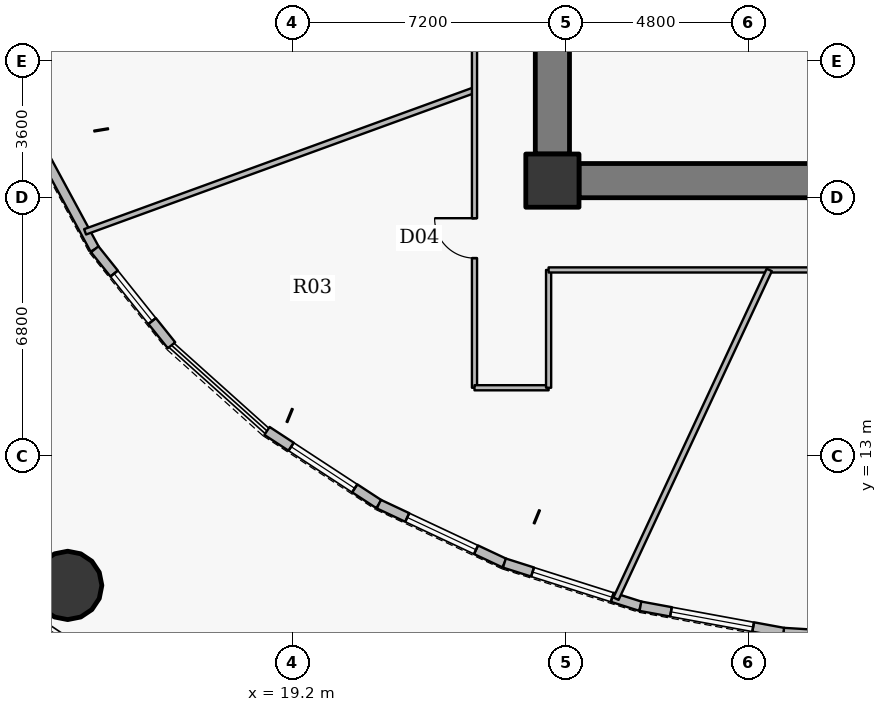
"""IFC4 building model, lengths in metres.
Left out: names, types, materials, properties, quantities, classifications, styles, units other than length and angle.
Written with IfcOpenShell. Run it as: python <this file> out.ifc"""

import sys

from ifc_helpers import new_model, si_unit, direction, frame, frame_2d, origin, origin_2d, place, context, subcontext, project, spatial, rectangle, hollow_circle, extrude, source, transform, mapped, element, fill, save


model = new_model("IFC4")
c1 = context("Model", 3, precision=1e-05, world=origin(), true_north=direction((0.0, 1.0)))
c2 = subcontext(c1, "Body", "Model", "MODEL_VIEW")
j1 = project(units=[si_unit("LENGTHUNIT", "METRE"), si_unit("PLANEANGLEUNIT", "RADIAN")], contexts=[c1])
p1 = place(None, origin())
s1 = spatial("IfcSite", under=j1, at=p1, CompositionType="ELEMENT")
p2 = place(p1, origin())
s2 = spatial("IfcBuilding", under=s1, at=p2, CompositionType="ELEMENT")
p3 = place(p2, frame((0.0, 0.0, 27.0)))
s3 = spatial("IfcBuildingStorey", under=s2, at=p3, CompositionType="ELEMENT", Elevation=27.0)
p4 = place(p3, frame((26.05, 20.25, 0.0), z_axis=(0.0, 0.0, 1.0), x_axis=(1.0, 0.0, 0.0)))
e1 = element("IfcColumn", 1, at=p4, inside=s3, PredefinedType="COLUMN", context=c2, shape_type="SweptSolid", body=[
    extrude(rectangle(XDim=1.4, YDim=1.4, at=origin_2d()), origin(), (0.0, 0.0, 1.0), 5.4),
])
p5 = place(p3, frame((45.25, 20.25, 0.0), z_axis=(0.0, 0.0, 1.0), x_axis=(-1.0, 0.0, 0.0)))
e2 = element("IfcWall", 2, at=p5, inside=s3, PredefinedType="SHEAR", context=c2, shape_type="SweptSolid", body=[
    extrude(rectangle(XDim=18.5, YDim=0.9, at=frame_2d((9.25, 0.0))), origin(), (0.0, 0.0, 1.0), 4.6),
])
p6 = place(p5, frame((10.0, 0.0, 0.0)))
e3 = element("IfcOpeningElement", 3, at=p6, cuts=e2, PredefinedType="OPENING", context=c2, shape_type="SweptSolid", body=[
    extrude(rectangle(XDim=1.15, YDim=2.15, at=origin_2d()), frame((0.575, 0.46, 1.075), z_axis=(0.0, -1.0, 0.0), x_axis=(1.0, 0.0, 0.0)), (0.0, 0.0, 1.0), 0.92),
])
p7 = place(p3, frame((26.05, 20.95, 0.0), z_axis=(0.0, 0.0, 1.0), x_axis=(0.0, 1.0, 0.0)))
e4 = element("IfcWall", 4, at=p7, inside=s3, PredefinedType="SHEAR", context=c2, shape_type="SweptSolid", body=[
    extrude(rectangle(XDim=12.1, YDim=0.9, at=frame_2d((6.05, 0.0))), origin(), (0.0, 0.0, 1.0), 4.6),
])
p8 = place(p7, frame((5.64, 0.0, 0.0)))
e5 = element("IfcOpeningElement", 5, at=p8, cuts=e4, PredefinedType="OPENING", context=c2, shape_type="SweptSolid", body=[
    extrude(rectangle(XDim=0.82, YDim=2.1, at=origin_2d()), frame((0.41, 0.46, 1.05), z_axis=(0.0, -1.0, 0.0), x_axis=(1.0, 0.0, 0.0)), (0.0, 0.0, 1.0), 0.92),
])
p9 = place(p3, frame((13.295, 9.599, 0.0), z_axis=(0.0, 0.0, 1.0), x_axis=(1.0, 0.0, 0.0)))
e6 = element("IfcColumn", 6, at=p9, inside=s3, PredefinedType="COLUMN", context=c2, shape_type="SweptSolid", body=[
    extrude(hollow_circle(Radius=0.9, WallThickness=0.05, at=origin_2d()), origin(), (0.0, 0.0, 1.0), 5.15),
])
p10 = place(p3, frame((14.007, 18.443, 0.0), z_axis=(0.0, 0.0, 1.0), x_axis=(-0.475607390776, 0.879657666276, 0.0)))
e7 = element("IfcWall", 7, at=p10, inside=s3, PredefinedType="SOLIDWALL", context=c2, shape_type="SweptSolid", body=[
    extrude(rectangle(XDim=3.108, YDim=0.25, at=frame_2d((1.554, 0.0))), origin(), (0.0, 0.0, 1.0), 3.185),
])
p11 = place(p3, frame((16.027, 15.918, 0.0), z_axis=(0.0, 0.0, 1.0), x_axis=(-0.624639806262, 0.780912999272, 0.0)))
e8 = element("IfcWall", 8, at=p11, inside=s3, PredefinedType="SOLIDWALL", context=c2, shape_type="SweptSolid", body=[
    extrude(rectangle(XDim=3.234, YDim=0.25, at=frame_2d((1.617, 0.0))), origin(), (0.0, 0.0, 1.0), 5.15),
])
p12 = place(p11, frame((0.817, 0.0, 0.9)))
e9 = element("IfcOpeningElement", 9, at=p12, cuts=e8, PredefinedType="OPENING", context=c2, shape_type="SweptSolid", body=[
    extrude(rectangle(XDim=1.6, YDim=1.75, at=origin_2d()), frame((0.8, 0.135, 0.875), z_axis=(0.0, -1.0, 0.0), x_axis=(1.0, 0.0, 0.0)), (0.0, 0.0, 1.0), 0.27),
])
p13 = place(p3, frame((21.484, 11.738, 0.0), z_axis=(0.0, 0.0, 1.0), x_axis=(-0.836749499899, 0.547585860317, 0.0)))
e10 = element("IfcWall", 10, at=p13, inside=s3, PredefinedType="SOLIDWALL", context=c2, shape_type="SweptSolid", body=[
    extrude(rectangle(XDim=3.518, YDim=0.25, at=frame_2d((1.759, 0.0))), origin(), (0.0, 0.0, 1.0), 3.185),
])
p14 = place(p13, frame((0.759, 0.0, 0.9)))
e11 = element("IfcOpeningElement", 11, at=p14, cuts=e10, PredefinedType="OPENING", context=c2, shape_type="SweptSolid", body=[
    extrude(rectangle(XDim=2.0, YDim=1.75, at=origin_2d()), frame((1.0, 0.135, 0.875), z_axis=(0.0, -1.0, 0.0), x_axis=(1.0, 0.0, 0.0)), (0.0, 0.0, 1.0), 0.27),
])
p15 = place(p3, frame((24.786, 10.187, 0.0), z_axis=(0.0, 0.0, 1.0), x_axis=(-0.905208052634, 0.424968682901, 0.0)))
e12 = element("IfcWall", 12, at=p15, inside=s3, PredefinedType="SOLIDWALL", context=c2, shape_type="SweptSolid", body=[
    extrude(rectangle(XDim=3.649, YDim=0.25, at=frame_2d((1.824, 0.0))), origin(), (0.0, 0.0, 1.0), 3.185),
])
p16 = place(p15, frame((0.824, 0.0, 0.9)))
e13 = element("IfcOpeningElement", 13, at=p16, cuts=e12, PredefinedType="OPENING", context=c2, shape_type="SweptSolid", body=[
    extrude(rectangle(XDim=2.0, YDim=1.75, at=origin_2d()), frame((1.0, 0.135, 0.875), z_axis=(0.0, -1.0, 0.0), x_axis=(1.0, 0.0, 0.0)), (0.0, 0.0, 1.0), 0.27),
])
p17 = place(p3, frame((28.366, 9.051, 0.0), z_axis=(0.0, 0.0, 1.0), x_axis=(-0.953166212936, 0.302446971412, 0.0)))
e14 = element("IfcWall", 14, at=p17, inside=s3, PredefinedType="SOLIDWALL", context=c2, shape_type="SweptSolid", body=[
    extrude(rectangle(XDim=3.756, YDim=0.25, at=frame_2d((1.878, 0.0))), origin(), (0.0, 0.0, 1.0), 3.185),
])
p18 = place(p17, frame((0.778, 0.0, 0.9)))
e15 = element("IfcOpeningElement", 15, at=p18, cuts=e14, PredefinedType="OPENING", context=c2, shape_type="SweptSolid", body=[
    extrude(rectangle(XDim=2.2, YDim=2.0, at=origin_2d()), frame((1.1, 0.135, 1.0), z_axis=(0.0, -1.0, 0.0), x_axis=(1.0, 0.0, 0.0)), (0.0, 0.0, 1.0), 0.27),
])
p19 = place(p3, frame((32.135, 8.358, 0.0), z_axis=(0.0, 0.0, 1.0), x_axis=(-0.983496768781, 0.180925691368, 0.0)))
e16 = element("IfcWall", 16, at=p19, inside=s3, PredefinedType="SOLIDWALL", context=c2, shape_type="SweptSolid", body=[
    extrude(rectangle(XDim=3.832, YDim=0.25, at=frame_2d((1.916, 0.0))), origin(), (0.0, 0.0, 1.0), 5.15),
])
p20 = place(p19, frame((0.816, 0.0, 0.9)))
e17 = element("IfcOpeningElement", 17, at=p20, cuts=e16, PredefinedType="OPENING", context=c2, shape_type="SweptSolid", body=[
    extrude(rectangle(XDim=2.2, YDim=2.0, at=origin_2d()), frame((1.1, 0.135, 1.0), z_axis=(0.0, -1.0, 0.0), x_axis=(1.0, 0.0, 0.0)), (0.0, 0.0, 1.0), 0.27),
])
p21 = place(p3, frame((36.0, 8.125, 0.0), z_axis=(0.0, 0.0, 1.0), x_axis=(-0.998188749064, 0.060159963776, 0.0)))
e18 = element("IfcWall", 18, at=p21, inside=s3, PredefinedType="SOLIDWALL", context=c2, shape_type="SweptSolid", body=[
    extrude(rectangle(XDim=3.872, YDim=0.25, at=frame_2d((1.936, 0.0))), origin(), (0.0, 0.0, 1.0), 3.185),
])
p22 = place(p21, frame((0.836, 0.0, 0.9)))
e19 = element("IfcOpeningElement", 19, at=p22, cuts=e18, PredefinedType="OPENING", context=c2, shape_type="SweptSolid", body=[
    extrude(rectangle(XDim=2.2, YDim=2.0, at=origin_2d()), frame((1.1, 0.135, 1.0), z_axis=(0.0, -1.0, 0.0), x_axis=(1.0, 0.0, 0.0)), (0.0, 0.0, 1.0), 0.27),
])
p23 = place(p3, frame((13.753, 18.903, 0.0), z_axis=(0.0, 0.0, 1.0), x_axis=(0.939694021803, 0.342016294038, 0.0)))
e20 = element("IfcWall", 20, at=p23, inside=s3, PredefinedType="PARTITIONING", context=c2, shape_type="SweptSolid", body=[
    extrude(rectangle(XDim=10.905, YDim=0.15, at=frame_2d((5.452, 0.0))), origin(), (0.0, 0.0, 1.0), 5.15),
])
p24 = place(p3, frame((24.0, 14.8, 0.0), z_axis=(0.0, 0.0, 1.0), x_axis=(0.0, 1.0, 0.0)))
e21 = element("IfcWall", 21, at=p24, inside=s3, PredefinedType="PARTITIONING", context=c2, shape_type="SweptSolid", body=[
    extrude(rectangle(XDim=12.78, YDim=0.135, at=frame_2d((6.39, 0.0))), origin(), (0.0, 0.0, 1.0), 3.185),
])
p25 = place(p24, frame((3.411, 0.0, 0.0)))
e22 = element("IfcOpeningElement", 22, at=p25, cuts=e21, PredefinedType="OPENING", context=c2, shape_type="SweptSolid", body=[
    extrude(rectangle(XDim=1.05, YDim=2.15, at=origin_2d()), frame((0.525, 0.078, 1.075), z_axis=(0.0, -1.0, 0.0), x_axis=(1.0, 0.0, 0.0)), (0.0, 0.0, 1.0), 0.155),
])
p26 = place(p3, frame((24.0, 14.8, 0.0), z_axis=(0.0, 0.0, 1.0), x_axis=(1.0, 0.0, 0.0)))
e23 = element("IfcWall", 23, at=p26, inside=s3, PredefinedType="PARTITIONING", context=c2, shape_type="SweptSolid", body=[
    extrude(rectangle(XDim=1.95, YDim=0.135, at=frame_2d((0.975, 0.0))), origin(), (0.0, 0.0, 1.0), 5.15),
])
p27 = place(p3, frame((25.95, 14.8, 0.0), z_axis=(0.0, 0.0, 1.0), x_axis=(0.0, 1.0, 0.0)))
e24 = element("IfcWall", 24, at=p27, inside=s3, PredefinedType="PARTITIONING", context=c2, shape_type="SweptSolid", body=[
    extrude(rectangle(XDim=3.1, YDim=0.135, at=frame_2d((1.55, 0.0))), origin(), (0.0, 0.0, 1.0), 5.15),
])
p28 = place(p3, frame((25.95, 17.9, 0.0), z_axis=(0.0, 0.0, 1.0), x_axis=(1.0, 0.0, 0.0)))
e25 = element("IfcWall", 25, at=p28, inside=s3, PredefinedType="PARTITIONING", context=c2, shape_type="SweptSolid", body=[
    extrude(rectangle(XDim=10.25, YDim=0.135, at=frame_2d((5.125, 0.0))), origin(), (0.0, 0.0, 1.0), 3.185),
])
p29 = place(p28, frame((7.483, 0.0, 0.0)))
e26 = element("IfcOpeningElement", 26, at=p29, cuts=e25, PredefinedType="OPENING", context=c2, shape_type="SweptSolid", body=[
    extrude(rectangle(XDim=1.05, YDim=2.15, at=origin_2d()), frame((0.525, 0.078, 1.075), z_axis=(0.0, -1.0, 0.0), x_axis=(1.0, 0.0, 0.0)), (0.0, 0.0, 1.0), 0.155),
])
p30 = place(p3, frame((27.723, 9.25, 0.0), z_axis=(0.0, 0.0, 1.0), x_axis=(0.422622169532, 0.906305964793, 0.0)))
e27 = element("IfcWall", 27, at=p30, inside=s3, PredefinedType="PARTITIONING", context=c2, shape_type="SweptSolid", body=[
    extrude(rectangle(XDim=9.544, YDim=0.15, at=frame_2d((4.772, 0.0))), origin(), (0.0, 0.0, 1.0), 5.15),
])
p31 = place(p3, frame((25.6, 20.94, 0.0), z_axis=(0.0, 0.0, 1.0), x_axis=(0.0, -1.0, 0.0)))
e28 = element("IfcWall", 28, at=p31, inside=s3, PredefinedType="PARTITIONING", context=c2, shape_type="SweptSolid", body=[
    extrude(rectangle(XDim=1.14, YDim=0.135, at=frame_2d((0.57, 0.0))), origin(), (0.0, 0.0, 1.0), 5.15),
])
p32 = place(p3, frame((25.907, 19.8, 0.0), z_axis=(0.0, 0.0, 1.0), x_axis=(1.0, 0.0, 0.0)))
e29 = element("IfcWall", 29, at=p32, inside=s3, PredefinedType="PARTITIONING", context=c2, shape_type="SweptSolid", body=[
    extrude(rectangle(XDim=0.833, YDim=0.135, at=frame_2d((0.416, 0.0))), origin(), (0.0, 0.0, 1.0), 3.185),
])
m1 = source(origin(), c2, "Body", "SweptSolid", [
    extrude(rectangle(XDim=1.6, YDim=1.75, at=origin_2d()), frame((0.8, 0.03, 0.875), z_axis=(0.0, -1.0, 0.0), x_axis=(1.0, 0.0, 0.0)), (0.0, 0.0, 1.0), 0.06),
])
p33 = place(p12, origin())
e30 = element("IfcWindow", 30, at=p33, inside=s3, PartitioningType="DOUBLE_PANEL_VERTICAL", PredefinedType="WINDOW", context=c2, shape_type="MappedRepresentation", body=[
    mapped(m1, transform((0.0, 0.0, 0.0), x_axis=(1.0, 0.0, 0.0), y_axis=(0.0, 1.0, 0.0), z_axis=(0.0, 0.0, 1.0), scale=1.0)),
])
fill(e9, e30)
m2 = source(origin(), c2, "Body", "SweptSolid", [
    extrude(rectangle(XDim=2.0, YDim=1.75, at=origin_2d()), frame((1.0, 0.03, 0.875), z_axis=(0.0, -1.0, 0.0), x_axis=(1.0, 0.0, 0.0)), (0.0, 0.0, 1.0), 0.06),
])
p34 = place(p14, origin())
e31 = element("IfcWindow", 31, at=p34, inside=s3, PartitioningType="DOUBLE_PANEL_VERTICAL", PredefinedType="WINDOW", context=c2, shape_type="MappedRepresentation", body=[
    mapped(m2, transform((0.0, 0.0, 0.0), x_axis=(1.0, 0.0, 0.0), y_axis=(0.0, 1.0, 0.0), z_axis=(0.0, 0.0, 1.0), scale=1.0)),
])
fill(e11, e31)
p35 = place(p16, origin())
e32 = element("IfcWindow", 32, at=p35, inside=s3, PartitioningType="DOUBLE_PANEL_VERTICAL", PredefinedType="WINDOW", context=c2, shape_type="MappedRepresentation", body=[
    mapped(m2, transform((0.0, 0.0, 0.0), x_axis=(1.0, 0.0, 0.0), y_axis=(0.0, 1.0, 0.0), z_axis=(0.0, 0.0, 1.0), scale=1.0)),
])
fill(e13, e32)
m3 = source(origin(), c2, "Body", "SweptSolid", [
    extrude(rectangle(XDim=2.2, YDim=2.0, at=origin_2d()), frame((1.1, 0.03, 1.0), z_axis=(0.0, -1.0, 0.0), x_axis=(1.0, 0.0, 0.0)), (0.0, 0.0, 1.0), 0.06),
])
p36 = place(p18, origin())
e33 = element("IfcWindow", 33, at=p36, inside=s3, PartitioningType="TRIPLE_PANEL_VERTICAL", PredefinedType="WINDOW", context=c2, shape_type="MappedRepresentation", body=[
    mapped(m3, transform((0.0, 0.0, 0.0), x_axis=(1.0, 0.0, 0.0), y_axis=(0.0, 1.0, 0.0), z_axis=(0.0, 0.0, 1.0), scale=1.0)),
])
fill(e15, e33)
p37 = place(p20, origin())
e34 = element("IfcWindow", 34, at=p37, inside=s3, PartitioningType="TRIPLE_PANEL_VERTICAL", PredefinedType="WINDOW", context=c2, shape_type="MappedRepresentation", body=[
    mapped(m3, transform((0.0, 0.0, 0.0), x_axis=(1.0, 0.0, 0.0), y_axis=(0.0, 1.0, 0.0), z_axis=(0.0, 0.0, 1.0), scale=1.0)),
])
fill(e17, e34)
m4 = source(origin(), c2, "Body", "SweptSolid", [
    extrude(rectangle(XDim=1.05, YDim=2.15, at=origin_2d()), frame((0.525, 0.025, 1.075), z_axis=(0.0, -1.0, 0.0), x_axis=(1.0, 0.0, 0.0)), (0.0, 0.0, 1.0), 0.05),
])
p38 = place(p25, origin())
e35 = element("IfcDoor", 35, at=p38, inside=s3, OperationType="SINGLE_SWING_RIGHT", PredefinedType="DOOR", context=c2, shape_type="MappedRepresentation", body=[
    mapped(m4, transform((0.0, 0.0, 0.0), x_axis=(1.0, 0.0, 0.0), y_axis=(0.0, 1.0, 0.0), z_axis=(0.0, 0.0, 1.0), scale=1.0)),
])
fill(e22, e35)
save(model, sys.argv[1])
